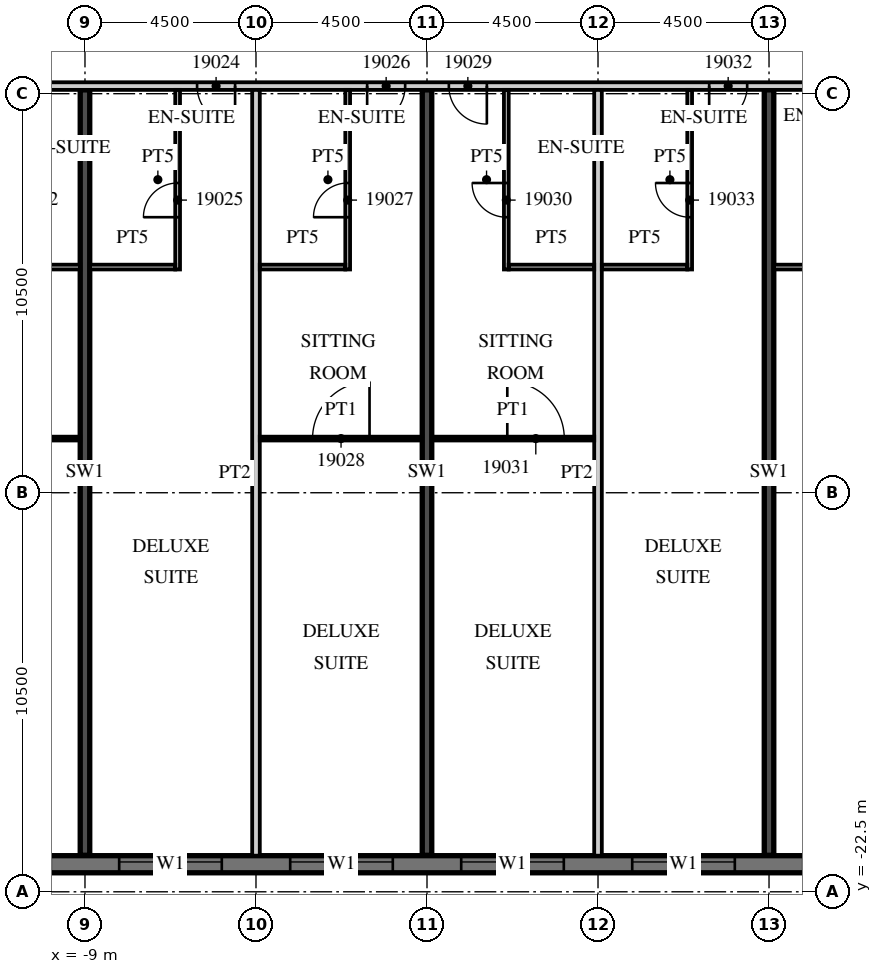
"""IFC4 building model, lengths in metres.
Left out: names, types, materials, properties, quantities, classifications, styles, units other than length and angle.
Written with IfcOpenShell. Run it as: python <this file> out.ifc"""

import sys

from ifc_helpers import new_model, si_unit, direction, frame, frame_2d, origin, place, context, subcontext, project, spatial, rectangle, extrude, element, fill, save


model = new_model("IFC4")
c1 = context("Model", 3, precision=1e-05, world=origin(), true_north=direction((0.0, 1.0)))
c2 = subcontext(c1, "Body", "Model", "MODEL_VIEW")
j1 = project(units=[si_unit("LENGTHUNIT", "METRE"), si_unit("PLANEANGLEUNIT", "RADIAN")], contexts=[c1])
p1 = place(None, origin())
s1 = spatial("IfcSite", under=j1, at=p1, CompositionType="ELEMENT")
p2 = place(p1, origin())
s2 = spatial("IfcBuilding", under=s1, at=p2, CompositionType="ELEMENT")
p3 = place(p2, frame((0.0, 0.0, 93.0)))
s3 = spatial("IfcBuildingStorey", under=s2, at=p3, CompositionType="ELEMENT", Elevation=93.0)
for number, where, z_axis, x_axis in (
    (1, (-9.0, -21.54, 0.0), (0.0, 0.0, 1.0), (0.0, 1.0, 0.0)),
    (2, (0.0, -21.54, 0.0), (0.0, 0.0, 1.0), (0.0, 1.0, 0.0)),
    (3, (9.0, -21.54, 0.0), (0.0, 0.0, 1.0), (0.0, 1.0, 0.0)),
):
    element("IfcWall", number, at=place(p3, frame(where, z_axis=z_axis, x_axis=x_axis)), inside=s3, PredefinedType="SHEAR", context=c2, shape_type="SweptSolid", body=[
        extrude(rectangle(XDim=20.14, YDim=0.25, at=frame_2d((10.07, 0.0))), origin(), (0.0, 0.0, 1.0), 3.3),
    ])
p4 = place(p3, frame((-13.5, -21.775, 0.0), z_axis=(0.0, 0.0, 1.0), x_axis=(1.0, 0.0, 0.0)))
e4 = element("IfcWall", 4, at=p4, inside=s3, PredefinedType="SOLIDWALL", context=c2, shape_type="SweptSolid", body=[
    extrude(rectangle(XDim=54.5, YDim=0.45, at=frame_2d((27.25, 0.0))), origin(), (0.0, 0.0, 1.0), 3.02),
])
p5 = place(p4, frame((0.9, 0.0, 0.45)))
e5 = element("IfcOpeningElement", 5, at=p5, cuts=e4, PredefinedType="OPENING", context=c2, shape_type="SweptSolid", body=[
    extrude(rectangle(XDim=2.7, YDim=2.25, at=frame_2d((1.35, 1.125))), frame((0.0, 0.235, 0.0), z_axis=(0.0, -1.0, 0.0), x_axis=(1.0, 0.0, 0.0)), (0.0, 0.0, 1.0), 0.47),
])
p6 = place(p4, frame((5.4, 0.0, 0.45)))
e6 = element("IfcOpeningElement", 6, at=p6, cuts=e4, PredefinedType="OPENING", context=c2, shape_type="SweptSolid", body=[
    extrude(rectangle(XDim=2.7, YDim=2.25, at=frame_2d((1.35, 1.125))), frame((0.0, 0.235, 0.0), z_axis=(0.0, -1.0, 0.0), x_axis=(1.0, 0.0, 0.0)), (0.0, 0.0, 1.0), 0.47),
])
p7 = place(p4, frame((9.9, 0.0, 0.45)))
e7 = element("IfcOpeningElement", 7, at=p7, cuts=e4, PredefinedType="OPENING", context=c2, shape_type="SweptSolid", body=[
    extrude(rectangle(XDim=2.7, YDim=2.25, at=frame_2d((1.35, 1.125))), frame((0.0, 0.235, 0.0), z_axis=(0.0, -1.0, 0.0), x_axis=(1.0, 0.0, 0.0)), (0.0, 0.0, 1.0), 0.47),
])
p8 = place(p4, frame((14.4, 0.0, 0.45)))
e8 = element("IfcOpeningElement", 8, at=p8, cuts=e4, PredefinedType="OPENING", context=c2, shape_type="SweptSolid", body=[
    extrude(rectangle(XDim=2.7, YDim=2.25, at=frame_2d((1.35, 1.125))), frame((0.0, 0.235, 0.0), z_axis=(0.0, -1.0, 0.0), x_axis=(1.0, 0.0, 0.0)), (0.0, 0.0, 1.0), 0.47),
])
p9 = place(p4, frame((18.9, 0.0, 0.45)))
e9 = element("IfcOpeningElement", 9, at=p9, cuts=e4, PredefinedType="OPENING", context=c2, shape_type="SweptSolid", body=[
    extrude(rectangle(XDim=2.7, YDim=2.25, at=frame_2d((1.35, 1.125))), frame((0.0, 0.235, 0.0), z_axis=(0.0, -1.0, 0.0), x_axis=(1.0, 0.0, 0.0)), (0.0, 0.0, 1.0), 0.47),
])
p10 = place(p4, frame((23.4, 0.0, 0.45)))
e10 = element("IfcOpeningElement", 10, at=p10, cuts=e4, PredefinedType="OPENING", context=c2, shape_type="SweptSolid", body=[
    extrude(rectangle(XDim=2.7, YDim=2.25, at=frame_2d((1.35, 1.125))), frame((0.0, 0.235, 0.0), z_axis=(0.0, -1.0, 0.0), x_axis=(1.0, 0.0, 0.0)), (0.0, 0.0, 1.0), 0.47),
])
p11 = place(p4, frame((27.9, 0.0, 0.45)))
e11 = element("IfcOpeningElement", 11, at=p11, cuts=e4, PredefinedType="OPENING", context=c2, shape_type="SweptSolid", body=[
    extrude(rectangle(XDim=2.7, YDim=2.25, at=frame_2d((1.35, 1.125))), frame((0.0, 0.235, 0.0), z_axis=(0.0, -1.0, 0.0), x_axis=(1.0, 0.0, 0.0)), (0.0, 0.0, 1.0), 0.47),
])
p12 = place(p4, frame((32.4, 0.0, 0.45)))
e12 = element("IfcOpeningElement", 12, at=p12, cuts=e4, PredefinedType="OPENING", context=c2, shape_type="SweptSolid", body=[
    extrude(rectangle(XDim=2.7, YDim=2.25, at=frame_2d((1.35, 1.125))), frame((0.0, 0.235, 0.0), z_axis=(0.0, -1.0, 0.0), x_axis=(1.0, 0.0, 0.0)), (0.0, 0.0, 1.0), 0.47),
])
p13 = place(p4, frame((36.9, 0.0, 0.45)))
e13 = element("IfcOpeningElement", 13, at=p13, cuts=e4, PredefinedType="OPENING", context=c2, shape_type="SweptSolid", body=[
    extrude(rectangle(XDim=2.7, YDim=2.25, at=frame_2d((1.35, 1.125))), frame((0.0, 0.235, 0.0), z_axis=(0.0, -1.0, 0.0), x_axis=(1.0, 0.0, 0.0)), (0.0, 0.0, 1.0), 0.47),
])
p14 = place(p4, frame((41.4, 0.0, 0.45)))
e14 = element("IfcOpeningElement", 14, at=p14, cuts=e4, PredefinedType="OPENING", context=c2, shape_type="SweptSolid", body=[
    extrude(rectangle(XDim=2.7, YDim=2.25, at=frame_2d((1.35, 1.125))), frame((0.0, 0.235, 0.0), z_axis=(0.0, -1.0, 0.0), x_axis=(1.0, 0.0, 0.0)), (0.0, 0.0, 1.0), 0.47),
])
p15 = place(p4, frame((45.9, 0.0, 0.45)))
e15 = element("IfcOpeningElement", 15, at=p15, cuts=e4, PredefinedType="OPENING", context=c2, shape_type="SweptSolid", body=[
    extrude(rectangle(XDim=2.7, YDim=2.25, at=frame_2d((1.35, 1.125))), frame((0.0, 0.235, 0.0), z_axis=(0.0, -1.0, 0.0), x_axis=(1.0, 0.0, 0.0)), (0.0, 0.0, 1.0), 0.47),
])
p16 = place(p4, frame((50.4, 0.0, 0.45)))
e16 = element("IfcOpeningElement", 16, at=p16, cuts=e4, PredefinedType="OPENING", context=c2, shape_type="SweptSolid", body=[
    extrude(rectangle(XDim=2.7, YDim=2.25, at=frame_2d((1.35, 1.125))), frame((0.0, 0.235, 0.0), z_axis=(0.0, -1.0, 0.0), x_axis=(1.0, 0.0, 0.0)), (0.0, 0.0, 1.0), 0.47),
])
p17 = place(p3, frame((-13.5, -1.3, 0.0), z_axis=(0.0, 0.0, 1.0), x_axis=(1.0, 0.0, 0.0)))
e17 = element("IfcWall", 17, at=p17, inside=s3, PredefinedType="PARTITIONING", context=c2, shape_type="SweptSolid", body=[
    extrude(rectangle(XDim=58.05, YDim=0.2, at=frame_2d((29.025, 0.0))), origin(), (0.0, 0.0, 1.0), 3.02),
])
p18 = place(p17, frame((0.575, 0.0, 0.0)))
e18 = element("IfcOpeningElement", 18, at=p18, cuts=e17, PredefinedType="OPENING", context=c2, shape_type="SweptSolid", body=[
    extrude(rectangle(XDim=1.0, YDim=2.1, at=frame_2d((0.5, 1.05))), frame((0.0, 0.11, 0.0), z_axis=(0.0, -1.0, 0.0), x_axis=(1.0, 0.0, 0.0)), (0.0, 0.0, 1.0), 0.22),
])
p19 = place(p17, frame((7.45, 0.0, 0.0)))
e19 = element("IfcOpeningElement", 19, at=p19, cuts=e17, PredefinedType="OPENING", context=c2, shape_type="SweptSolid", body=[
    extrude(rectangle(XDim=1.0, YDim=2.1, at=frame_2d((0.5, 1.05))), frame((0.0, 0.11, 0.0), z_axis=(0.0, -1.0, 0.0), x_axis=(1.0, 0.0, 0.0)), (0.0, 0.0, 1.0), 0.22),
])
p20 = place(p17, frame((11.925, 0.0, 0.0)))
e20 = element("IfcOpeningElement", 20, at=p20, cuts=e17, PredefinedType="OPENING", context=c2, shape_type="SweptSolid", body=[
    extrude(rectangle(XDim=1.0, YDim=2.1, at=frame_2d((0.5, 1.05))), frame((0.0, 0.11, 0.0), z_axis=(0.0, -1.0, 0.0), x_axis=(1.0, 0.0, 0.0)), (0.0, 0.0, 1.0), 0.22),
])
p21 = place(p17, frame((14.075, 0.0, 0.0)))
e21 = element("IfcOpeningElement", 21, at=p21, cuts=e17, PredefinedType="OPENING", context=c2, shape_type="SweptSolid", body=[
    extrude(rectangle(XDim=1.0, YDim=2.1, at=frame_2d((0.5, 1.05))), frame((0.0, 0.11, 0.0), z_axis=(0.0, -1.0, 0.0), x_axis=(1.0, 0.0, 0.0)), (0.0, 0.0, 1.0), 0.22),
])
p22 = place(p17, frame((20.925, 0.0, 0.0)))
e22 = element("IfcOpeningElement", 22, at=p22, cuts=e17, PredefinedType="OPENING", context=c2, shape_type="SweptSolid", body=[
    extrude(rectangle(XDim=1.0, YDim=2.1, at=frame_2d((0.5, 1.05))), frame((0.0, 0.11, 0.0), z_axis=(0.0, -1.0, 0.0), x_axis=(1.0, 0.0, 0.0)), (0.0, 0.0, 1.0), 0.22),
])
p23 = place(p17, frame((27.862, 0.0, 0.0)))
e23 = element("IfcOpeningElement", 23, at=p23, cuts=e17, PredefinedType="OPENING", context=c2, shape_type="SweptSolid", body=[
    extrude(rectangle(XDim=1.2, YDim=2.1, at=frame_2d((0.6, 1.05))), frame((0.0, 0.11, 0.0), z_axis=(0.0, -1.0, 0.0), x_axis=(1.0, 0.0, 0.0)), (0.0, 0.0, 1.0), 0.22),
])
p24 = place(p17, frame((33.938, 0.0, 0.0)))
e24 = element("IfcOpeningElement", 24, at=p24, cuts=e17, PredefinedType="OPENING", context=c2, shape_type="SweptSolid", body=[
    extrude(rectangle(XDim=1.2, YDim=2.1, at=frame_2d((0.6, 1.05))), frame((0.0, 0.11, 0.0), z_axis=(0.0, -1.0, 0.0), x_axis=(1.0, 0.0, 0.0)), (0.0, 0.0, 1.0), 0.22),
])
p25 = place(p17, frame((45.862, 0.0, 0.0)))
e25 = element("IfcOpeningElement", 25, at=p25, cuts=e17, PredefinedType="OPENING", context=c2, shape_type="SweptSolid", body=[
    extrude(rectangle(XDim=1.2, YDim=2.1, at=frame_2d((0.6, 1.05))), frame((0.0, 0.11, 0.0), z_axis=(0.0, -1.0, 0.0), x_axis=(1.0, 0.0, 0.0)), (0.0, 0.0, 1.0), 0.22),
])
p26 = place(p17, frame((52.425, 0.0, 0.0)))
e26 = element("IfcOpeningElement", 26, at=p26, cuts=e17, PredefinedType="OPENING", context=c2, shape_type="SweptSolid", body=[
    extrude(rectangle(XDim=1.0, YDim=2.1, at=frame_2d((0.5, 1.05))), frame((0.0, 0.11, 0.0), z_axis=(0.0, -1.0, 0.0), x_axis=(1.0, 0.0, 0.0)), (0.0, 0.0, 1.0), 0.22),
])
p27 = place(p17, frame((56.525, 0.0, 0.0)))
e27 = element("IfcOpeningElement", 27, at=p27, cuts=e17, PredefinedType="OPENING", context=c2, shape_type="SweptSolid", body=[
    extrude(rectangle(XDim=1.0, YDim=2.1, at=frame_2d((0.5, 1.05))), frame((0.0, 0.11, 0.0), z_axis=(0.0, -1.0, 0.0), x_axis=(1.0, 0.0, 0.0)), (0.0, 0.0, 1.0), 0.22),
])
p28 = place(p3, frame((-11.375, -6.062, 0.0), z_axis=(0.0, 0.0, 1.0), x_axis=(1.0, 0.0, 0.0)))
e28 = element("IfcWall", 28, at=p28, inside=s3, PredefinedType="PARTITIONING", context=c2, shape_type="SweptSolid", body=[
    extrude(rectangle(XDim=2.25, YDim=0.125, at=frame_2d((1.125, 0.0))), origin(), (0.0, 0.0, 1.0), 3.02),
])
p29 = place(p3, frame((-13.4, -10.575, 0.0), z_axis=(0.0, 0.0, 1.0), x_axis=(1.0, 0.0, 0.0)))
e29 = element("IfcWall", 29, at=p29, inside=s3, PredefinedType="PARTITIONING", context=c2, shape_type="SweptSolid", body=[
    extrude(rectangle(XDim=4.275, YDim=0.1, at=frame_2d((2.137, 0.0))), origin(), (0.0, 0.0, 1.0), 3.02),
])
p30 = place(p29, frame((0.788, 0.0, 0.0)))
e30 = element("IfcOpeningElement", 30, at=p30, cuts=e29, PredefinedType="OPENING", context=c2, shape_type="SweptSolid", body=[
    extrude(rectangle(XDim=1.5, YDim=2.1, at=frame_2d((0.75, 1.05))), frame((0.0, 0.06, 0.0), z_axis=(0.0, -1.0, 0.0), x_axis=(1.0, 0.0, 0.0)), (0.0, 0.0, 1.0), 0.12),
])
p31 = place(p3, frame((-4.5, -21.55, 0.0), z_axis=(0.0, 0.0, 1.0), x_axis=(0.0, 1.0, 0.0)))
e31 = element("IfcWall", 31, at=p31, inside=s3, PredefinedType="PARTITIONING", context=c2, shape_type="SweptSolid", body=[
    extrude(rectangle(XDim=20.15, YDim=0.2, at=frame_2d((10.075, 0.0))), origin(), (0.0, 0.0, 1.0), 3.02),
])
p32 = place(p3, frame((-6.562, -6.125, 0.0), z_axis=(0.0, 0.0, 1.0), x_axis=(0.0, 1.0, 0.0)))
e32 = element("IfcWall", 32, at=p32, inside=s3, PredefinedType="PARTITIONING", context=c2, shape_type="SweptSolid", body=[
    extrude(rectangle(XDim=4.725, YDim=0.125, at=frame_2d((2.363, 0.0))), origin(), (0.0, 0.0, 1.0), 3.02),
])
p33 = place(p32, frame((1.375, 0.0, 0.0)))
e33 = element("IfcOpeningElement", 33, at=p33, cuts=e32, PredefinedType="OPENING", context=c2, shape_type="SweptSolid", body=[
    extrude(rectangle(XDim=0.9, YDim=2.1, at=frame_2d((0.45, 1.05))), frame((0.0, 0.073, 0.0), z_axis=(0.0, -1.0, 0.0), x_axis=(1.0, 0.0, 0.0)), (0.0, 0.0, 1.0), 0.145),
])
p34 = place(p3, frame((-8.875, -6.062, 0.0), z_axis=(0.0, 0.0, 1.0), x_axis=(1.0, 0.0, 0.0)))
e34 = element("IfcWall", 34, at=p34, inside=s3, PredefinedType="PARTITIONING", context=c2, shape_type="SweptSolid", body=[
    extrude(rectangle(XDim=2.25, YDim=0.125, at=frame_2d((1.125, 0.0))), origin(), (0.0, 0.0, 1.0), 3.02),
])
p35 = place(p3, frame((-2.087, -6.125, 0.0), z_axis=(0.0, 0.0, 1.0), x_axis=(0.0, 1.0, 0.0)))
e35 = element("IfcWall", 35, at=p35, inside=s3, PredefinedType="PARTITIONING", context=c2, shape_type="SweptSolid", body=[
    extrude(rectangle(XDim=4.725, YDim=0.125, at=frame_2d((2.363, 0.0))), origin(), (0.0, 0.0, 1.0), 3.02),
])
p36 = place(p35, frame((1.375, 0.0, 0.0)))
e36 = element("IfcOpeningElement", 36, at=p36, cuts=e35, PredefinedType="OPENING", context=c2, shape_type="SweptSolid", body=[
    extrude(rectangle(XDim=0.9, YDim=2.1, at=frame_2d((0.45, 1.05))), frame((0.0, 0.073, 0.0), z_axis=(0.0, -1.0, 0.0), x_axis=(1.0, 0.0, 0.0)), (0.0, 0.0, 1.0), 0.145),
])
p37 = place(p3, frame((-4.4, -6.062, 0.0), z_axis=(0.0, 0.0, 1.0), x_axis=(1.0, 0.0, 0.0)))
e37 = element("IfcWall", 37, at=p37, inside=s3, PredefinedType="PARTITIONING", context=c2, shape_type="SweptSolid", body=[
    extrude(rectangle(XDim=2.25, YDim=0.125, at=frame_2d((1.125, 0.0))), origin(), (0.0, 0.0, 1.0), 3.02),
])
p38 = place(p3, frame((-4.4, -10.575, 0.0), z_axis=(0.0, 0.0, 1.0), x_axis=(1.0, 0.0, 0.0)))
e38 = element("IfcWall", 38, at=p38, inside=s3, PredefinedType="PARTITIONING", context=c2, shape_type="SweptSolid", body=[
    extrude(rectangle(XDim=4.275, YDim=0.1, at=frame_2d((2.137, 0.0))), origin(), (0.0, 0.0, 1.0), 3.02),
])
p39 = place(p38, frame((1.388, 0.0, 0.0)))
e39 = element("IfcOpeningElement", 39, at=p39, cuts=e38, PredefinedType="OPENING", context=c2, shape_type="SweptSolid", body=[
    extrude(rectangle(XDim=1.5, YDim=2.1, at=frame_2d((0.75, 1.05))), frame((0.0, 0.06, 0.0), z_axis=(0.0, -1.0, 0.0), x_axis=(1.0, 0.0, 0.0)), (0.0, 0.0, 1.0), 0.12),
])
p40 = place(p3, frame((4.5, -21.55, 0.0), z_axis=(0.0, 0.0, 1.0), x_axis=(0.0, 1.0, 0.0)))
e40 = element("IfcWall", 40, at=p40, inside=s3, PredefinedType="PARTITIONING", context=c2, shape_type="SweptSolid", body=[
    extrude(rectangle(XDim=20.15, YDim=0.2, at=frame_2d((10.075, 0.0))), origin(), (0.0, 0.0, 1.0), 3.02),
])
p41 = place(p3, frame((2.087, -6.125, 0.0), z_axis=(0.0, 0.0, 1.0), x_axis=(0.0, 1.0, 0.0)))
e41 = element("IfcWall", 41, at=p41, inside=s3, PredefinedType="PARTITIONING", context=c2, shape_type="SweptSolid", body=[
    extrude(rectangle(XDim=4.725, YDim=0.125, at=frame_2d((2.363, 0.0))), origin(), (0.0, 0.0, 1.0), 3.02),
])
p42 = place(p41, frame((1.375, 0.0, 0.0)))
e42 = element("IfcOpeningElement", 42, at=p42, cuts=e41, PredefinedType="OPENING", context=c2, shape_type="SweptSolid", body=[
    extrude(rectangle(XDim=0.9, YDim=2.1, at=frame_2d((0.45, 1.05))), frame((0.0, 0.073, 0.0), z_axis=(0.0, -1.0, 0.0), x_axis=(1.0, 0.0, 0.0)), (0.0, 0.0, 1.0), 0.145),
])
p43 = place(p3, frame((2.15, -6.062, 0.0), z_axis=(0.0, 0.0, 1.0), x_axis=(1.0, 0.0, 0.0)))
e43 = element("IfcWall", 43, at=p43, inside=s3, PredefinedType="PARTITIONING", context=c2, shape_type="SweptSolid", body=[
    extrude(rectangle(XDim=2.25, YDim=0.125, at=frame_2d((1.125, 0.0))), origin(), (0.0, 0.0, 1.0), 3.02),
])
p44 = place(p3, frame((0.125, -10.575, 0.0), z_axis=(0.0, 0.0, 1.0), x_axis=(1.0, 0.0, 0.0)))
e44 = element("IfcWall", 44, at=p44, inside=s3, PredefinedType="PARTITIONING", context=c2, shape_type="SweptSolid", body=[
    extrude(rectangle(XDim=4.275, YDim=0.1, at=frame_2d((2.137, 0.0))), origin(), (0.0, 0.0, 1.0), 3.02),
])
p45 = place(p44, frame((1.988, 0.0, 0.0)))
e45 = element("IfcOpeningElement", 45, at=p45, cuts=e44, PredefinedType="OPENING", context=c2, shape_type="SweptSolid", body=[
    extrude(rectangle(XDim=1.5, YDim=2.1, at=frame_2d((0.75, 1.05))), frame((0.0, 0.06, 0.0), z_axis=(0.0, -1.0, 0.0), x_axis=(1.0, 0.0, 0.0)), (0.0, 0.0, 1.0), 0.12),
])
p46 = place(p3, frame((6.912, -6.125, 0.0), z_axis=(0.0, 0.0, 1.0), x_axis=(0.0, 1.0, 0.0)))
e46 = element("IfcWall", 46, at=p46, inside=s3, PredefinedType="PARTITIONING", context=c2, shape_type="SweptSolid", body=[
    extrude(rectangle(XDim=4.725, YDim=0.125, at=frame_2d((2.363, 0.0))), origin(), (0.0, 0.0, 1.0), 3.02),
])
p47 = place(p46, frame((1.375, 0.0, 0.0)))
e47 = element("IfcOpeningElement", 47, at=p47, cuts=e46, PredefinedType="OPENING", context=c2, shape_type="SweptSolid", body=[
    extrude(rectangle(XDim=0.9, YDim=2.1, at=frame_2d((0.45, 1.05))), frame((0.0, 0.073, 0.0), z_axis=(0.0, -1.0, 0.0), x_axis=(1.0, 0.0, 0.0)), (0.0, 0.0, 1.0), 0.145),
])
p48 = place(p3, frame((4.6, -6.062, 0.0), z_axis=(0.0, 0.0, 1.0), x_axis=(1.0, 0.0, 0.0)))
e48 = element("IfcWall", 48, at=p48, inside=s3, PredefinedType="PARTITIONING", context=c2, shape_type="SweptSolid", body=[
    extrude(rectangle(XDim=2.25, YDim=0.125, at=frame_2d((1.125, 0.0))), origin(), (0.0, 0.0, 1.0), 3.02),
])
p49 = place(p3, frame((9.125, -6.062, 0.0), z_axis=(0.0, 0.0, 1.0), x_axis=(1.0, 0.0, 0.0)))
e49 = element("IfcWall", 49, at=p49, inside=s3, PredefinedType="PARTITIONING", context=c2, shape_type="SweptSolid", body=[
    extrude(rectangle(XDim=2.8, YDim=0.125, at=frame_2d((1.4, 0.0))), origin(), (0.0, 0.0, 1.0), 3.02),
])
p50 = place(p6, origin())
e50 = element("IfcWindow", 50, at=p50, inside=s3, PartitioningType="SINGLE_PANEL", PredefinedType="WINDOW", context=c2, shape_type="SweptSolid", body=[
    extrude(rectangle(XDim=2.7, YDim=2.25, at=frame_2d((1.35, 1.125))), frame((0.0, 0.09, 0.0), z_axis=(0.0, -1.0, 0.0), x_axis=(1.0, 0.0, 0.0)), (0.0, 0.0, 1.0), 0.06),
])
fill(e6, e50)
p51 = place(p7, origin())
e51 = element("IfcWindow", 51, at=p51, inside=s3, PartitioningType="SINGLE_PANEL", PredefinedType="WINDOW", context=c2, shape_type="SweptSolid", body=[
    extrude(rectangle(XDim=2.7, YDim=2.25, at=frame_2d((1.35, 1.125))), frame((0.0, 0.09, 0.0), z_axis=(0.0, -1.0, 0.0), x_axis=(1.0, 0.0, 0.0)), (0.0, 0.0, 1.0), 0.06),
])
fill(e7, e51)
p52 = place(p8, origin())
e52 = element("IfcWindow", 52, at=p52, inside=s3, PartitioningType="SINGLE_PANEL", PredefinedType="WINDOW", context=c2, shape_type="SweptSolid", body=[
    extrude(rectangle(XDim=2.7, YDim=2.25, at=frame_2d((1.35, 1.125))), frame((0.0, 0.09, 0.0), z_axis=(0.0, -1.0, 0.0), x_axis=(1.0, 0.0, 0.0)), (0.0, 0.0, 1.0), 0.06),
])
fill(e8, e52)
p53 = place(p9, origin())
e53 = element("IfcWindow", 53, at=p53, inside=s3, PartitioningType="SINGLE_PANEL", PredefinedType="WINDOW", context=c2, shape_type="SweptSolid", body=[
    extrude(rectangle(XDim=2.7, YDim=2.25, at=frame_2d((1.35, 1.125))), frame((0.0, 0.09, 0.0), z_axis=(0.0, -1.0, 0.0), x_axis=(1.0, 0.0, 0.0)), (0.0, 0.0, 1.0), 0.06),
])
fill(e9, e53)
p54 = place(p19, origin())
e54 = element("IfcDoor", 54, at=p54, inside=s3, OperationType="SINGLE_SWING_RIGHT", PredefinedType="DOOR", context=c2, shape_type="SweptSolid", body=[
    extrude(rectangle(XDim=1.0, YDim=2.1, at=frame_2d((0.5, 1.05))), frame((0.0, 0.025, 0.0), z_axis=(0.0, -1.0, 0.0), x_axis=(1.0, 0.0, 0.0)), (0.0, 0.0, 1.0), 0.05),
])
fill(e19, e54)
p55 = place(p33, origin())
e55 = element("IfcDoor", 55, at=p55, inside=s3, OperationType="SINGLE_SWING_LEFT", PredefinedType="DOOR", context=c2, shape_type="SweptSolid", body=[
    extrude(rectangle(XDim=0.9, YDim=2.1, at=frame_2d((0.45, 1.05))), frame((0.0, 0.025, 0.0), z_axis=(0.0, -1.0, 0.0), x_axis=(1.0, 0.0, 0.0)), (0.0, 0.0, 1.0), 0.05),
])
fill(e33, e55)
p56 = place(p20, origin())
e56 = element("IfcDoor", 56, at=p56, inside=s3, OperationType="SINGLE_SWING_LEFT", PredefinedType="DOOR", context=c2, shape_type="SweptSolid", body=[
    extrude(rectangle(XDim=1.0, YDim=2.1, at=frame_2d((0.5, 1.05))), frame((0.0, 0.025, 0.0), z_axis=(0.0, -1.0, 0.0), x_axis=(1.0, 0.0, 0.0)), (0.0, 0.0, 1.0), 0.05),
])
fill(e20, e56)
p57 = place(p36, origin())
e57 = element("IfcDoor", 57, at=p57, inside=s3, OperationType="SINGLE_SWING_LEFT", PredefinedType="DOOR", context=c2, shape_type="SweptSolid", body=[
    extrude(rectangle(XDim=0.9, YDim=2.1, at=frame_2d((0.45, 1.05))), frame((0.0, 0.025, 0.0), z_axis=(0.0, -1.0, 0.0), x_axis=(1.0, 0.0, 0.0)), (0.0, 0.0, 1.0), 0.05),
])
fill(e36, e57)
p58 = place(p39, origin())
e58 = element("IfcDoor", 58, at=p58, inside=s3, OperationType="SINGLE_SWING_RIGHT", PredefinedType="DOOR", context=c2, shape_type="SweptSolid", body=[
    extrude(rectangle(XDim=1.5, YDim=2.1, at=frame_2d((0.75, 1.05))), frame((0.0, 0.025, 0.0), z_axis=(0.0, -1.0, 0.0), x_axis=(1.0, 0.0, 0.0)), (0.0, 0.0, 1.0), 0.05),
])
fill(e39, e58)
p59 = place(p21, origin())
e59 = element("IfcDoor", 59, at=p59, inside=s3, OperationType="SINGLE_SWING_RIGHT", PredefinedType="DOOR", context=c2, shape_type="SweptSolid", body=[
    extrude(rectangle(XDim=1.0, YDim=2.1, at=frame_2d((0.5, 1.05))), frame((0.0, 0.025, 0.0), z_axis=(0.0, -1.0, 0.0), x_axis=(1.0, 0.0, 0.0)), (0.0, 0.0, 1.0), 0.05),
])
fill(e21, e59)
p60 = place(p42, origin())
e60 = element("IfcDoor", 60, at=p60, inside=s3, OperationType="SINGLE_SWING_RIGHT", PredefinedType="DOOR", context=c2, shape_type="SweptSolid", body=[
    extrude(rectangle(XDim=0.9, YDim=2.1, at=frame_2d((0.45, 1.05))), frame((0.0, 0.025, 0.0), z_axis=(0.0, -1.0, 0.0), x_axis=(1.0, 0.0, 0.0)), (0.0, 0.0, 1.0), 0.05),
])
fill(e42, e60)
p61 = place(p45, origin())
e61 = element("IfcDoor", 61, at=p61, inside=s3, OperationType="SINGLE_SWING_LEFT", PredefinedType="DOOR", context=c2, shape_type="SweptSolid", body=[
    extrude(rectangle(XDim=1.5, YDim=2.1, at=frame_2d((0.75, 1.05))), frame((0.0, 0.025, 0.0), z_axis=(0.0, -1.0, 0.0), x_axis=(1.0, 0.0, 0.0)), (0.0, 0.0, 1.0), 0.05),
])
fill(e45, e61)
p62 = place(p22, origin())
e62 = element("IfcDoor", 62, at=p62, inside=s3, OperationType="SINGLE_SWING_LEFT", PredefinedType="DOOR", context=c2, shape_type="SweptSolid", body=[
    extrude(rectangle(XDim=1.0, YDim=2.1, at=frame_2d((0.5, 1.05))), frame((0.0, 0.025, 0.0), z_axis=(0.0, -1.0, 0.0), x_axis=(1.0, 0.0, 0.0)), (0.0, 0.0, 1.0), 0.05),
])
fill(e22, e62)
p63 = place(p47, origin())
e63 = element("IfcDoor", 63, at=p63, inside=s3, OperationType="SINGLE_SWING_RIGHT", PredefinedType="DOOR", context=c2, shape_type="SweptSolid", body=[
    extrude(rectangle(XDim=0.9, YDim=2.1, at=frame_2d((0.45, 1.05))), frame((0.0, 0.025, 0.0), z_axis=(0.0, -1.0, 0.0), x_axis=(1.0, 0.0, 0.0)), (0.0, 0.0, 1.0), 0.05),
])
fill(e47, e63)
save(model, sys.argv[1])
